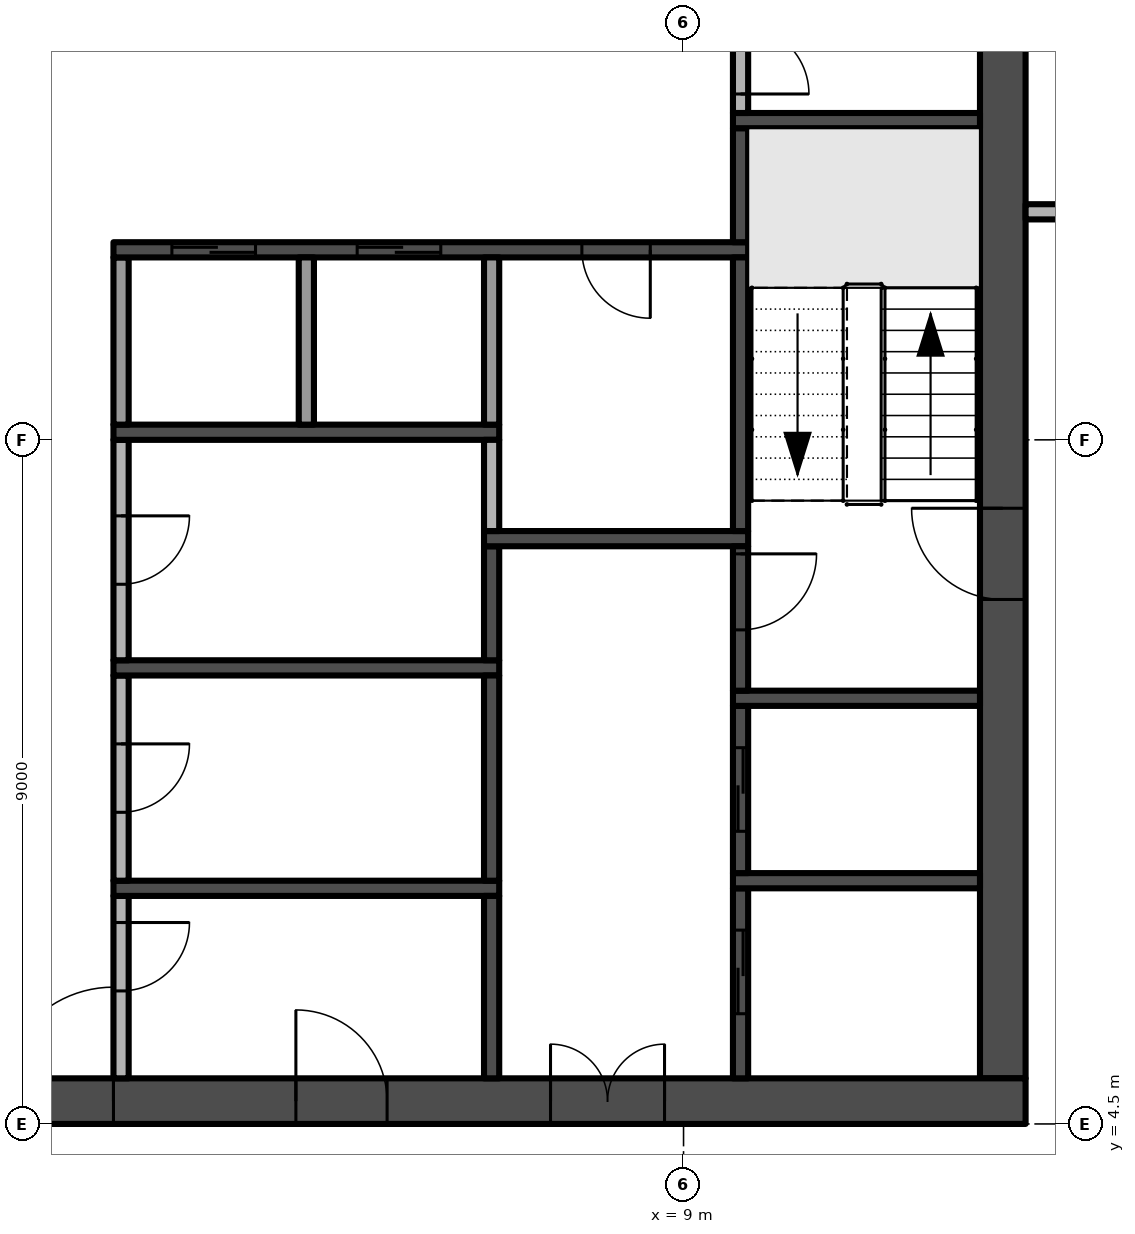
"""IFC4 building model, lengths in metres.
Left out: names, types, materials, properties, quantities, classifications, styles, units other than length and angle.
Written with IfcOpenShell. Run it as: python <this file> out.ifc"""

import sys

from ifc_helpers import new_model, si_unit, direction, frame, frame_2d, origin, place, context, subcontext, project, spatial, rectangle, extrude, element, fill, save


model = new_model("IFC4")
c1 = context("Model", 3, precision=1e-05, world=origin(), true_north=direction((0.0, 1.0)))
c2 = subcontext(c1, "Body", "Model", "MODEL_VIEW")
j1 = project(units=[si_unit("LENGTHUNIT", "METRE"), si_unit("PLANEANGLEUNIT", "RADIAN")], contexts=[c1])
p1 = place(None, origin())
s1 = spatial("IfcSite", under=j1, at=p1, CompositionType="ELEMENT")
p2 = place(p1, origin())
s2 = spatial("IfcBuilding", under=s1, at=p2, CompositionType="ELEMENT")
p3 = place(p2, frame((0.0, 0.0, 242.6)))
s3 = spatial("IfcBuildingStorey", under=s2, at=p3, CompositionType="ELEMENT", Elevation=242.6)
p4 = place(p3, frame((-13.5, 4.8, -0.3), z_axis=(0.0, 0.0, 1.0), x_axis=(1.0, 0.0, 0.0)))
e1 = element("IfcWall", 1, at=p4, inside=s3, PredefinedType="SHEAR", context=c2, shape_type="SweptSolid", body=[
    extrude(rectangle(XDim=27.0, YDim=0.6, at=frame_2d((13.5, 0.0))), origin(), (0.0, 0.0, 1.0), 3.8),
])
p5 = place(p4, frame((12.0, 0.0, 0.3)))
e2 = element("IfcOpeningElement", 2, at=p5, cuts=e1, PredefinedType="OPENING", context=c2, shape_type="SweptSolid", body=[
    extrude(rectangle(XDim=3.0, YDim=2.4, at=frame_2d((1.5, 1.2))), frame((0.0, 0.31, 0.0), z_axis=(0.0, -1.0, 0.0), x_axis=(1.0, 0.0, 0.0)), (0.0, 0.0, 1.0), 0.62),
])
p6 = place(p4, frame((4.9, 0.0, 0.3)))
e3 = element("IfcOpeningElement", 3, at=p6, cuts=e1, PredefinedType="OPENING", context=c2, shape_type="SweptSolid", body=[
    extrude(rectangle(XDim=1.2, YDim=2.2, at=frame_2d((0.6, 1.1))), frame((0.0, 0.31, 0.0), z_axis=(0.0, -1.0, 0.0), x_axis=(1.0, 0.0, 0.0)), (0.0, 0.0, 1.0), 0.62),
])
p7 = place(p4, frame((20.75, 0.0, 0.3)))
e4 = element("IfcOpeningElement", 4, at=p7, cuts=e1, PredefinedType="OPENING", context=c2, shape_type="SweptSolid", body=[
    extrude(rectangle(XDim=1.5, YDim=2.2, at=frame_2d((0.75, 1.1))), frame((0.0, 0.31, 0.0), z_axis=(0.0, -1.0, 0.0), x_axis=(1.0, 0.0, 0.0)), (0.0, 0.0, 1.0), 0.62),
])
p8 = place(p4, frame((17.4, 0.0, 0.3)))
e5 = element("IfcOpeningElement", 5, at=p8, cuts=e1, PredefinedType="OPENING", context=c2, shape_type="SweptSolid", body=[
    extrude(rectangle(XDim=1.2, YDim=2.2, at=frame_2d((0.6, 1.1))), frame((0.0, 0.31, 0.0), z_axis=(0.0, -1.0, 0.0), x_axis=(1.0, 0.0, 0.0)), (0.0, 0.0, 1.0), 0.62),
])
p9 = place(p3, frame((13.2, 5.1, -0.3), z_axis=(0.0, 0.0, 1.0), x_axis=(0.0, 1.0, 0.0)))
e6 = element("IfcWall", 6, at=p9, inside=s3, PredefinedType="SHEAR", context=c2, shape_type="SweptSolid", body=[
    extrude(rectangle(XDim=16.8, YDim=0.6, at=frame_2d((8.4, 0.0))), origin(), (0.0, 0.0, 1.0), 3.8),
])
p10 = place(p9, frame((6.3, 0.0, 0.3)))
e7 = element("IfcOpeningElement", 7, at=p10, cuts=e6, PredefinedType="OPENING", context=c2, shape_type="SweptSolid", body=[
    extrude(rectangle(XDim=1.2, YDim=2.2, at=frame_2d((0.6, 1.1))), frame((0.0, 0.31, 0.0), z_axis=(0.0, -1.0, 0.0), x_axis=(1.0, 0.0, 0.0)), (0.0, 0.0, 1.0), 0.62),
])
p11 = place(p3, frame((1.6, 7.5, 0.0), z_axis=(0.0, 0.0, 1.0), x_axis=(0.0, -1.0, 0.0)))
e8 = element("IfcWall", 8, at=p11, inside=s3, PredefinedType="PARTITIONING", context=c2, shape_type="SweptSolid", body=[
    extrude(rectangle(XDim=2.4, YDim=0.2, at=frame_2d((1.2, 0.0))), origin(), (0.0, 0.0, 1.0), 3.5),
])
p12 = place(p11, frame((0.35, 0.0, 0.0)))
e9 = element("IfcOpeningElement", 9, at=p12, cuts=e8, PredefinedType="OPENING", context=c2, shape_type="SweptSolid", body=[
    extrude(rectangle(XDim=0.9, YDim=2.1, at=frame_2d((0.45, 1.05))), frame((0.0, 0.11, 0.0), z_axis=(0.0, -1.0, 0.0), x_axis=(1.0, 0.0, 0.0)), (0.0, 0.0, 1.0), 0.22),
])
p13 = place(p3, frame((1.5, 7.6, 0.0), z_axis=(0.0, 0.0, 1.0), x_axis=(1.0, 0.0, 0.0)))
e10 = element("IfcWall", 10, at=p13, inside=s3, PredefinedType="SHEAR", context=c2, shape_type="SweptSolid", body=[
    extrude(rectangle(XDim=5.075, YDim=0.2, at=frame_2d((2.538, 0.0))), origin(), (0.0, 0.0, 1.0), 3.5),
])
p14 = place(p3, frame((1.6, 10.4, 0.0), z_axis=(0.0, 0.0, 1.0), x_axis=(0.0, -1.0, 0.0)))
e11 = element("IfcWall", 11, at=p14, inside=s3, PredefinedType="PARTITIONING", context=c2, shape_type="SweptSolid", body=[
    extrude(rectangle(XDim=2.7, YDim=0.2, at=frame_2d((1.35, 0.0))), origin(), (0.0, 0.0, 1.0), 3.5),
])
p15 = place(p14, frame((0.9, 0.0, 0.0)))
e12 = element("IfcOpeningElement", 12, at=p15, cuts=e11, PredefinedType="OPENING", context=c2, shape_type="SweptSolid", body=[
    extrude(rectangle(XDim=0.9, YDim=2.1, at=frame_2d((0.45, 1.05))), frame((0.0, 0.11, 0.0), z_axis=(0.0, -1.0, 0.0), x_axis=(1.0, 0.0, 0.0)), (0.0, 0.0, 1.0), 0.22),
])
p16 = place(p3, frame((1.5, 10.5, 0.0), z_axis=(0.0, 0.0, 1.0), x_axis=(1.0, 0.0, 0.0)))
e13 = element("IfcWall", 13, at=p16, inside=s3, PredefinedType="SHEAR", context=c2, shape_type="SweptSolid", body=[
    extrude(rectangle(XDim=5.075, YDim=0.2, at=frame_2d((2.538, 0.0))), origin(), (0.0, 0.0, 1.0), 3.5),
])
p17 = place(p3, frame((1.6, 13.5, 0.0), z_axis=(0.0, 0.0, 1.0), x_axis=(0.0, -1.0, 0.0)))
e14 = element("IfcWall", 14, at=p17, inside=s3, PredefinedType="PARTITIONING", context=c2, shape_type="SweptSolid", body=[
    extrude(rectangle(XDim=2.9, YDim=0.2, at=frame_2d((1.45, 0.0))), origin(), (0.0, 0.0, 1.0), 3.5),
])
p18 = place(p17, frame((1.0, 0.0, 0.0)))
e15 = element("IfcOpeningElement", 15, at=p18, cuts=e14, PredefinedType="OPENING", context=c2, shape_type="SweptSolid", body=[
    extrude(rectangle(XDim=0.9, YDim=2.1, at=frame_2d((0.45, 1.05))), frame((0.0, 0.11, 0.0), z_axis=(0.0, -1.0, 0.0), x_axis=(1.0, 0.0, 0.0)), (0.0, 0.0, 1.0), 0.22),
])
p19 = place(p3, frame((1.5, 13.6, 0.0), z_axis=(0.0, 0.0, 1.0), x_axis=(1.0, 0.0, 0.0)))
e16 = element("IfcWall", 16, at=p19, inside=s3, PredefinedType="SHEAR", context=c2, shape_type="SweptSolid", body=[
    extrude(rectangle(XDim=5.075, YDim=0.2, at=frame_2d((2.538, 0.0))), origin(), (0.0, 0.0, 1.0), 3.5),
])
p20 = place(p3, frame((1.6, 13.7, 0.0), z_axis=(0.0, 0.0, 1.0), x_axis=(0.0, 1.0, 0.0)))
e17 = element("IfcWall", 17, at=p20, inside=s3, PredefinedType="PARTITIONING", context=c2, shape_type="SweptSolid", body=[
    extrude(rectangle(XDim=2.2, YDim=0.2, at=frame_2d((1.1, 0.0))), origin(), (0.0, 0.0, 1.0), 3.5),
])
p21 = place(p3, frame((9.85, 16.0, 0.0), z_axis=(0.0, 0.0, 1.0), x_axis=(-1.0, 0.0, 0.0)))
e18 = element("IfcWall", 18, at=p21, inside=s3, PredefinedType="SHEAR", context=c2, shape_type="SweptSolid", body=[
    extrude(rectangle(XDim=8.35, YDim=0.2, at=frame_2d((4.175, 0.0))), origin(), (0.0, 0.0, 1.0), 3.5),
])
p22 = place(p21, frame((6.481, 0.0, 0.0)))
e19 = element("IfcOpeningElement", 19, at=p22, cuts=e18, PredefinedType="OPENING", context=c2, shape_type="SweptSolid", body=[
    extrude(rectangle(XDim=1.1, YDim=2.1, at=frame_2d((0.55, 1.05))), frame((0.0, 0.11, 0.0), z_axis=(0.0, -1.0, 0.0), x_axis=(1.0, 0.0, 0.0)), (0.0, 0.0, 1.0), 0.22),
])
p23 = place(p21, frame((4.044, 0.0, 0.0)))
e20 = element("IfcOpeningElement", 20, at=p23, cuts=e18, PredefinedType="OPENING", context=c2, shape_type="SweptSolid", body=[
    extrude(rectangle(XDim=1.1, YDim=2.1, at=frame_2d((0.55, 1.05))), frame((0.0, 0.11, 0.0), z_axis=(0.0, -1.0, 0.0), x_axis=(1.0, 0.0, 0.0)), (0.0, 0.0, 1.0), 0.22),
])
p24 = place(p21, frame((1.288, 0.0, 0.0)))
e21 = element("IfcOpeningElement", 21, at=p24, cuts=e18, PredefinedType="OPENING", context=c2, shape_type="SweptSolid", body=[
    extrude(rectangle(XDim=0.9, YDim=2.1, at=frame_2d((0.45, 1.05))), frame((0.0, 0.11, 0.0), z_axis=(0.0, -1.0, 0.0), x_axis=(1.0, 0.0, 0.0)), (0.0, 0.0, 1.0), 0.22),
])
p25 = place(p3, frame((4.037, 13.7, 0.0), z_axis=(0.0, 0.0, 1.0), x_axis=(0.0, 1.0, 0.0)))
e22 = element("IfcWall", 22, at=p25, inside=s3, PredefinedType="PARTITIONING", context=c2, shape_type="SweptSolid", body=[
    extrude(rectangle(XDim=2.2, YDim=0.2, at=frame_2d((1.1, 0.0))), origin(), (0.0, 0.0, 1.0), 3.5),
])
p26 = place(p3, frame((6.475, 5.1, 0.0), z_axis=(0.0, 0.0, 1.0), x_axis=(0.0, 1.0, 0.0)))
e23 = element("IfcWall", 23, at=p26, inside=s3, PredefinedType="SHEAR", context=c2, shape_type="SweptSolid", body=[
    extrude(rectangle(XDim=2.4, YDim=0.2, at=frame_2d((1.2, 0.0))), origin(), (0.0, 0.0, 1.0), 3.5),
])
p27 = place(p3, frame((6.475, 7.7, 0.0), z_axis=(0.0, 0.0, 1.0), x_axis=(0.0, 1.0, 0.0)))
e24 = element("IfcWall", 24, at=p27, inside=s3, PredefinedType="SHEAR", context=c2, shape_type="SweptSolid", body=[
    extrude(rectangle(XDim=2.7, YDim=0.2, at=frame_2d((1.35, 0.0))), origin(), (0.0, 0.0, 1.0), 3.5),
])
p28 = place(p3, frame((6.475, 10.6, 0.0), z_axis=(0.0, 0.0, 1.0), x_axis=(0.0, 1.0, 0.0)))
e25 = element("IfcWall", 25, at=p28, inside=s3, PredefinedType="SHEAR", context=c2, shape_type="SweptSolid", body=[
    extrude(rectangle(XDim=1.5, YDim=0.2, at=frame_2d((0.75, 0.0))), origin(), (0.0, 0.0, 1.0), 3.5),
])
p29 = place(p3, frame((6.375, 12.2, 0.0), z_axis=(0.0, 0.0, 1.0), x_axis=(1.0, 0.0, 0.0)))
e26 = element("IfcWall", 26, at=p29, inside=s3, PredefinedType="SHEAR", context=c2, shape_type="SweptSolid", body=[
    extrude(rectangle(XDim=3.475, YDim=0.2, at=frame_2d((1.738, 0.0))), origin(), (0.0, 0.0, 1.0), 3.5),
])
p30 = place(p3, frame((6.475, 12.3, 0.0), z_axis=(0.0, 0.0, 1.0), x_axis=(0.0, 1.0, 0.0)))
e27 = element("IfcWall", 27, at=p30, inside=s3, PredefinedType="PARTITIONING", context=c2, shape_type="SweptSolid", body=[
    extrude(rectangle(XDim=1.2, YDim=0.2, at=frame_2d((0.6, 0.0))), origin(), (0.0, 0.0, 1.0), 3.5),
])
p31 = place(p3, frame((6.475, 13.7, 0.0), z_axis=(0.0, 0.0, 1.0), x_axis=(0.0, 1.0, 0.0)))
e28 = element("IfcWall", 28, at=p31, inside=s3, PredefinedType="PARTITIONING", context=c2, shape_type="SweptSolid", body=[
    extrude(rectangle(XDim=2.2, YDim=0.2, at=frame_2d((1.1, 0.0))), origin(), (0.0, 0.0, 1.0), 3.5),
])
p32 = place(p3, frame((9.75, 5.1, 0.0), z_axis=(0.0, 0.0, 1.0), x_axis=(0.0, 1.0, 0.0)))
e29 = element("IfcWall", 29, at=p32, inside=s3, PredefinedType="SHEAR", context=c2, shape_type="SweptSolid", body=[
    extrude(rectangle(XDim=2.5, YDim=0.2, at=frame_2d((1.25, 0.0))), origin(), (0.0, 0.0, 1.0), 3.5),
])
p33 = place(p32, frame((0.85, 0.0, 0.0)))
e30 = element("IfcOpeningElement", 30, at=p33, cuts=e29, PredefinedType="OPENING", context=c2, shape_type="SweptSolid", body=[
    extrude(rectangle(XDim=1.1, YDim=2.1, at=frame_2d((0.55, 1.05))), frame((0.0, 0.11, 0.0), z_axis=(0.0, -1.0, 0.0), x_axis=(1.0, 0.0, 0.0)), (0.0, 0.0, 1.0), 0.22),
])
p34 = place(p3, frame((9.65, 7.7, 0.0), z_axis=(0.0, 0.0, 1.0), x_axis=(1.0, 0.0, 0.0)))
e31 = element("IfcWall", 31, at=p34, inside=s3, PredefinedType="SHEAR", context=c2, shape_type="SweptSolid", body=[
    extrude(rectangle(XDim=3.25, YDim=0.2, at=frame_2d((1.625, 0.0))), origin(), (0.0, 0.0, 1.0), 3.5),
])
p35 = place(p3, frame((9.75, 7.8, 0.0), z_axis=(0.0, 0.0, 1.0), x_axis=(0.0, 1.0, 0.0)))
e32 = element("IfcWall", 32, at=p35, inside=s3, PredefinedType="SHEAR", context=c2, shape_type="SweptSolid", body=[
    extrude(rectangle(XDim=2.2, YDim=0.2, at=frame_2d((1.1, 0.0))), origin(), (0.0, 0.0, 1.0), 3.5),
])
p36 = place(p35, frame((0.55, 0.0, 0.0)))
e33 = element("IfcOpeningElement", 33, at=p36, cuts=e32, PredefinedType="OPENING", context=c2, shape_type="SweptSolid", body=[
    extrude(rectangle(XDim=1.1, YDim=2.1, at=frame_2d((0.55, 1.05))), frame((0.0, 0.11, 0.0), z_axis=(0.0, -1.0, 0.0), x_axis=(1.0, 0.0, 0.0)), (0.0, 0.0, 1.0), 0.22),
])
p37 = place(p3, frame((9.65, 10.1, 0.0), z_axis=(0.0, 0.0, 1.0), x_axis=(1.0, 0.0, 0.0)))
e34 = element("IfcWall", 34, at=p37, inside=s3, PredefinedType="SHEAR", context=c2, shape_type="SweptSolid", body=[
    extrude(rectangle(XDim=3.25, YDim=0.2, at=frame_2d((1.625, 0.0))), origin(), (0.0, 0.0, 1.0), 3.5),
])
p38 = place(p3, frame((9.75, 12.1, 0.0), z_axis=(0.0, 0.0, 1.0), x_axis=(0.0, -1.0, 0.0)))
e35 = element("IfcWall", 35, at=p38, inside=s3, PredefinedType="SHEAR", context=c2, shape_type="SweptSolid", body=[
    extrude(rectangle(XDim=1.9, YDim=0.2, at=frame_2d((0.95, 0.0))), origin(), (0.0, 0.0, 1.0), 3.5),
])
p39 = place(p38, frame((0.1, 0.0, 0.0)))
e36 = element("IfcOpeningElement", 36, at=p39, cuts=e35, PredefinedType="OPENING", context=c2, shape_type="SweptSolid", body=[
    extrude(rectangle(XDim=1.0, YDim=2.2, at=frame_2d((0.5, 1.1))), frame((0.0, 0.11, 0.0), z_axis=(0.0, -1.0, 0.0), x_axis=(1.0, 0.0, 0.0)), (0.0, 0.0, 1.0), 0.22),
])
p40 = place(p3, frame((9.75, 12.3, 0.0), z_axis=(0.0, 0.0, 1.0), x_axis=(0.0, 1.0, 0.0)))
e37 = element("IfcWall", 37, at=p40, inside=s3, PredefinedType="SHEAR", context=c2, shape_type="SweptSolid", body=[
    extrude(rectangle(XDim=3.6, YDim=0.2, at=frame_2d((1.8, 0.0))), origin(), (0.0, 0.0, 1.0), 3.5),
])
p41 = place(p3, frame((9.75, 16.1, 0.0), z_axis=(0.0, 0.0, 1.0), x_axis=(0.0, 1.0, 0.0)))
e38 = element("IfcWall", 38, at=p41, inside=s3, PredefinedType="SHEAR", context=c2, shape_type="SweptSolid", body=[
    extrude(rectangle(XDim=1.5, YDim=0.2, at=frame_2d((0.75, 0.0))), origin(), (0.0, 0.0, 1.0), 3.5),
])
p42 = place(p3, frame((9.65, 17.7, 0.0), z_axis=(0.0, 0.0, 1.0), x_axis=(1.0, 0.0, 0.0)))
e39 = element("IfcWall", 39, at=p42, inside=s3, PredefinedType="SHEAR", context=c2, shape_type="SweptSolid", body=[
    extrude(rectangle(XDim=3.25, YDim=0.2, at=frame_2d((1.625, 0.0))), origin(), (0.0, 0.0, 1.0), 3.5),
])
p43 = place(p3, frame((9.75, 19.2, 0.0), z_axis=(0.0, 0.0, 1.0), x_axis=(0.0, -1.0, 0.0)))
e40 = element("IfcWall", 40, at=p43, inside=s3, PredefinedType="PARTITIONING", context=c2, shape_type="SweptSolid", body=[
    extrude(rectangle(XDim=1.4, YDim=0.2, at=frame_2d((0.7, 0.0))), origin(), (0.0, 0.0, 1.0), 3.5),
])
p44 = place(p43, frame((0.25, 0.0, 0.0)))
e41 = element("IfcOpeningElement", 41, at=p44, cuts=e40, PredefinedType="OPENING", context=c2, shape_type="SweptSolid", body=[
    extrude(rectangle(XDim=0.9, YDim=2.1, at=frame_2d((0.45, 1.05))), frame((0.0, 0.11, 0.0), z_axis=(0.0, -1.0, 0.0), x_axis=(1.0, 0.0, 0.0)), (0.0, 0.0, 1.0), 0.22),
])
p45 = place(p3, frame((13.5, 16.5, 0.0), z_axis=(0.0, 0.0, 1.0), x_axis=(1.0, 0.0, 0.0)))
e42 = element("IfcWall", 42, at=p45, inside=s3, PredefinedType="PARTITIONING", context=c2, shape_type="SweptSolid", body=[
    extrude(rectangle(XDim=3.825, YDim=0.2, at=frame_2d((1.913, 0.0))), origin(), (0.0, 0.0, 1.0), 3.5),
])
p46 = place(p45, frame((1.55, 0.0, 0.0)))
e43 = element("IfcOpeningElement", 43, at=p46, cuts=e42, PredefinedType="OPENING", context=c2, shape_type="SweptSolid", body=[
    extrude(rectangle(XDim=0.9, YDim=2.1, at=frame_2d((0.45, 1.05))), frame((0.0, 0.11, 0.0), z_axis=(0.0, -1.0, 0.0), x_axis=(1.0, 0.0, 0.0)), (0.0, 0.0, 1.0), 0.22),
])
p47 = place(p5, frame((3.0, 0.0, 0.0), z_axis=(0.0, 0.0, 1.0), x_axis=(-1.0, 0.0, 0.0)))
e44 = element("IfcDoor", 44, at=p47, inside=s3, OperationType="DOUBLE_DOOR_SINGLE_SWING", PredefinedType="DOOR", context=c2, shape_type="SweptSolid", body=[
    extrude(rectangle(XDim=3.0, YDim=2.4, at=frame_2d((1.5, 1.2))), frame((0.0, 0.025, 0.0), z_axis=(0.0, -1.0, 0.0), x_axis=(1.0, 0.0, 0.0)), (0.0, 0.0, 1.0), 0.05),
])
fill(e2, e44)
p48 = place(p10, frame((1.2, 0.0, 0.0), z_axis=(0.0, 0.0, 1.0), x_axis=(-1.0, 0.0, 0.0)))
e45 = element("IfcDoor", 45, at=p48, inside=s3, OperationType="SINGLE_SWING_LEFT", PredefinedType="DOOR", context=c2, shape_type="SweptSolid", body=[
    extrude(rectangle(XDim=1.2, YDim=2.2, at=frame_2d((0.6, 1.1))), frame((0.0, 0.025, 0.0), z_axis=(0.0, -1.0, 0.0), x_axis=(1.0, 0.0, 0.0)), (0.0, 0.0, 1.0), 0.05),
])
fill(e7, e45)
p49 = place(p7, frame((1.5, 0.0, 0.0), z_axis=(0.0, 0.0, 1.0), x_axis=(-1.0, 0.0, 0.0)))
e46 = element("IfcDoor", 46, at=p49, inside=s3, OperationType="DOUBLE_DOOR_SINGLE_SWING", PredefinedType="DOOR", context=c2, shape_type="SweptSolid", body=[
    extrude(rectangle(XDim=1.5, YDim=2.2, at=frame_2d((0.75, 1.1))), frame((0.0, 0.025, 0.0), z_axis=(0.0, -1.0, 0.0), x_axis=(1.0, 0.0, 0.0)), (0.0, 0.0, 1.0), 0.05),
])
fill(e4, e46)
p50 = place(p8, frame((1.2, 0.0, 0.0), z_axis=(0.0, 0.0, 1.0), x_axis=(-1.0, 0.0, 0.0)))
e47 = element("IfcDoor", 47, at=p50, inside=s3, OperationType="SINGLE_SWING_RIGHT", PredefinedType="DOOR", context=c2, shape_type="SweptSolid", body=[
    extrude(rectangle(XDim=1.2, YDim=2.2, at=frame_2d((0.6, 1.1))), frame((0.0, 0.025, 0.0), z_axis=(0.0, -1.0, 0.0), x_axis=(1.0, 0.0, 0.0)), (0.0, 0.0, 1.0), 0.05),
])
fill(e5, e47)
p51 = place(p39, origin())
e48 = element("IfcDoor", 48, at=p51, inside=s3, OperationType="SINGLE_SWING_LEFT", PredefinedType="DOOR", context=c2, shape_type="SweptSolid", body=[
    extrude(rectangle(XDim=1.0, YDim=2.2, at=frame_2d((0.5, 1.1))), frame((0.0, 0.025, 0.0), z_axis=(0.0, -1.0, 0.0), x_axis=(1.0, 0.0, 0.0)), (0.0, 0.0, 1.0), 0.05),
])
fill(e36, e48)
p52 = place(p22, origin())
e49 = element("IfcDoor", 49, at=p52, inside=s3, OperationType="SLIDING_TO_RIGHT", PredefinedType="DOOR", context=c2, shape_type="SweptSolid", body=[
    extrude(rectangle(XDim=1.1, YDim=2.1, at=frame_2d((0.55, 1.05))), frame((0.0, 0.025, 0.0), z_axis=(0.0, -1.0, 0.0), x_axis=(1.0, 0.0, 0.0)), (0.0, 0.0, 1.0), 0.05),
])
fill(e19, e49)
p53 = place(p23, origin())
e50 = element("IfcDoor", 50, at=p53, inside=s3, OperationType="SLIDING_TO_RIGHT", PredefinedType="DOOR", context=c2, shape_type="SweptSolid", body=[
    extrude(rectangle(XDim=1.1, YDim=2.1, at=frame_2d((0.55, 1.05))), frame((0.0, 0.025, 0.0), z_axis=(0.0, -1.0, 0.0), x_axis=(1.0, 0.0, 0.0)), (0.0, 0.0, 1.0), 0.05),
])
fill(e20, e50)
p54 = place(p33, origin())
e51 = element("IfcDoor", 51, at=p54, inside=s3, OperationType="SLIDING_TO_RIGHT", PredefinedType="DOOR", context=c2, shape_type="SweptSolid", body=[
    extrude(rectangle(XDim=1.1, YDim=2.1, at=frame_2d((0.55, 1.05))), frame((0.0, 0.025, 0.0), z_axis=(0.0, -1.0, 0.0), x_axis=(1.0, 0.0, 0.0)), (0.0, 0.0, 1.0), 0.05),
])
fill(e30, e51)
p55 = place(p36, origin())
e52 = element("IfcDoor", 52, at=p55, inside=s3, OperationType="SLIDING_TO_RIGHT", PredefinedType="DOOR", context=c2, shape_type="SweptSolid", body=[
    extrude(rectangle(XDim=1.1, YDim=2.1, at=frame_2d((0.55, 1.05))), frame((0.0, 0.025, 0.0), z_axis=(0.0, -1.0, 0.0), x_axis=(1.0, 0.0, 0.0)), (0.0, 0.0, 1.0), 0.05),
])
fill(e33, e52)
p56 = place(p12, origin())
e53 = element("IfcDoor", 53, at=p56, inside=s3, OperationType="SINGLE_SWING_LEFT", PredefinedType="DOOR", context=c2, shape_type="SweptSolid", body=[
    extrude(rectangle(XDim=0.9, YDim=2.1, at=frame_2d((0.45, 1.05))), frame((0.0, 0.025, 0.0), z_axis=(0.0, -1.0, 0.0), x_axis=(1.0, 0.0, 0.0)), (0.0, 0.0, 1.0), 0.05),
])
fill(e9, e53)
p57 = place(p15, origin())
e54 = element("IfcDoor", 54, at=p57, inside=s3, OperationType="SINGLE_SWING_LEFT", PredefinedType="DOOR", context=c2, shape_type="SweptSolid", body=[
    extrude(rectangle(XDim=0.9, YDim=2.1, at=frame_2d((0.45, 1.05))), frame((0.0, 0.025, 0.0), z_axis=(0.0, -1.0, 0.0), x_axis=(1.0, 0.0, 0.0)), (0.0, 0.0, 1.0), 0.05),
])
fill(e12, e54)
p58 = place(p18, origin())
e55 = element("IfcDoor", 55, at=p58, inside=s3, OperationType="SINGLE_SWING_LEFT", PredefinedType="DOOR", context=c2, shape_type="SweptSolid", body=[
    extrude(rectangle(XDim=0.9, YDim=2.1, at=frame_2d((0.45, 1.05))), frame((0.0, 0.025, 0.0), z_axis=(0.0, -1.0, 0.0), x_axis=(1.0, 0.0, 0.0)), (0.0, 0.0, 1.0), 0.05),
])
fill(e15, e55)
p59 = place(p24, origin())
e56 = element("IfcDoor", 56, at=p59, inside=s3, OperationType="SINGLE_SWING_LEFT", PredefinedType="DOOR", context=c2, shape_type="SweptSolid", body=[
    extrude(rectangle(XDim=0.9, YDim=2.1, at=frame_2d((0.45, 1.05))), frame((0.0, 0.025, 0.0), z_axis=(0.0, -1.0, 0.0), x_axis=(1.0, 0.0, 0.0)), (0.0, 0.0, 1.0), 0.05),
])
fill(e21, e56)
p60 = place(p44, origin())
e57 = element("IfcDoor", 57, at=p60, inside=s3, OperationType="SINGLE_SWING_RIGHT", PredefinedType="DOOR", context=c2, shape_type="SweptSolid", body=[
    extrude(rectangle(XDim=0.9, YDim=2.1, at=frame_2d((0.45, 1.05))), frame((0.0, 0.025, 0.0), z_axis=(0.0, -1.0, 0.0), x_axis=(1.0, 0.0, 0.0)), (0.0, 0.0, 1.0), 0.05),
])
fill(e41, e57)
save(model, sys.argv[1])
